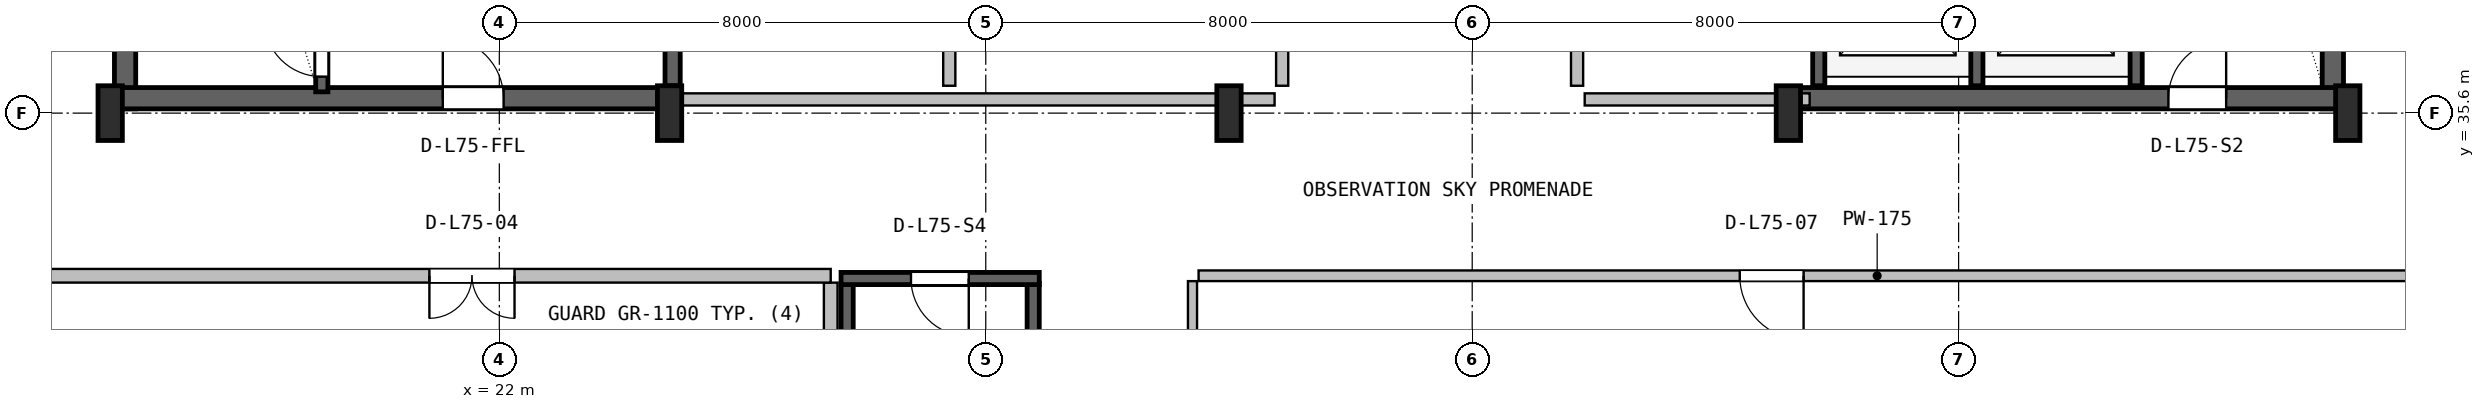
"""IFC4 building model, lengths in metres.
Left out: names, types, materials, properties, quantities, classifications, styles, units other than length and angle.
Written with IfcOpenShell. Run it as: python <this file> out.ifc"""

import sys

from ifc_helpers import new_model, si_unit, direction, frame, frame_2d, origin, origin_2d, place, context, subcontext, project, spatial, rectangle, i_section, extrude, source, transform, mapped, element, fill, save


model = new_model("IFC4")
c1 = context("Model", 3, precision=1e-05, world=origin(), true_north=direction((0.0, 1.0)))
c2 = subcontext(c1, "Body", "Model", "MODEL_VIEW")
j1 = project(units=[si_unit("LENGTHUNIT", "METRE"), si_unit("PLANEANGLEUNIT", "RADIAN")], contexts=[c1])
p1 = place(None, origin())
s1 = spatial("IfcSite", under=j1, at=p1, CompositionType="ELEMENT")
p2 = place(p1, origin())
s2 = spatial("IfcBuilding", under=s1, at=p2, CompositionType="ELEMENT")
p3 = place(p2, frame((0.0, 0.0, 300.2)))
s3 = spatial("IfcBuildingStorey", under=s2, at=p3, CompositionType="ELEMENT", Elevation=300.2)
for number, where, z_axis, x_axis in (
    (1, (15.845, 35.67, 0.0), (0.0, 0.0, 1.0), (0.0, 1.0, 0.0)),
    (2, (52.155, 35.67, 0.0), (0.0, 0.0, 1.0), (0.0, 1.0, 0.0)),
):
    element("IfcWall", number, at=place(p3, frame(where, z_axis=z_axis, x_axis=x_axis)), inside=s3, PredefinedType="SHEAR", context=c2, shape_type="SweptSolid", body=[
        extrude(rectangle(XDim=11.13, YDim=0.35, at=frame_2d((5.565, 0.0))), origin(), (0.0, 0.0, 1.0), 4.52),
    ])
p4 = place(p3, frame((15.67, 35.845, 0.0), z_axis=(0.0, 0.0, 1.0), x_axis=(1.0, 0.0, 0.0)))
e3 = element("IfcWall", 3, at=p4, inside=s3, PredefinedType="SHEAR", context=c2, shape_type="SweptSolid", body=[
    extrude(rectangle(XDim=9.13, YDim=0.35, at=frame_2d((4.565, 0.0))), origin(), (0.0, 0.0, 1.0), 4.52),
])
p5 = place(p4, frame((5.4, 0.0, 0.0)))
e4 = element("IfcOpeningElement", 4, at=p5, cuts=e3, PredefinedType="OPENING", context=c2, shape_type="SweptSolid", body=[
    extrude(rectangle(XDim=1.0, YDim=2.1, at=frame_2d((0.5, 1.05))), frame((0.0, 0.185, 0.0), z_axis=(0.0, -1.0, 0.0), x_axis=(1.0, 0.0, 0.0)), (0.0, 0.0, 1.0), 0.37),
])
p6 = place(p3, frame((43.2, 35.845, 0.0), z_axis=(0.0, 0.0, 1.0), x_axis=(1.0, 0.0, 0.0)))
e5 = element("IfcWall", 5, at=p6, inside=s3, PredefinedType="SHEAR", context=c2, shape_type="SweptSolid", body=[
    extrude(rectangle(XDim=9.13, YDim=0.35, at=frame_2d((4.565, 0.0))), origin(), (0.0, 0.0, 1.0), 4.52),
])
p7 = place(p6, frame((6.25, 0.0, 0.0)))
e6 = element("IfcOpeningElement", 6, at=p7, cuts=e5, PredefinedType="OPENING", context=c2, shape_type="SweptSolid", body=[
    extrude(rectangle(XDim=0.95, YDim=2.1, at=frame_2d((0.475, 1.05))), frame((0.0, 0.185, 0.0), z_axis=(0.0, -1.0, 0.0), x_axis=(1.0, 0.0, 0.0)), (0.0, 0.0, 1.0), 0.37),
])
m1 = source(origin(), c2, "Body", "SweptSolid", [
    extrude(i_section(OverallWidth=0.4, OverallDepth=0.9, WebThickness=0.016, FlangeThickness=0.028, FilletRadius=0.016, at=origin_2d()), origin(), (0.0, 0.0, 1.0), 4.8),
])
for number, where, z_axis, x_axis in (
    (7, (15.6, 35.6, 0.0), (0.0, 0.0, 1.0), (1.0, 0.0, 0.0)),
    (8, (24.8, 35.6, 0.0), (0.0, 0.0, 1.0), (1.0, 0.0, 0.0)),
    (9, (34.0, 35.6, 0.0), (0.0, 0.0, 1.0), (1.0, 0.0, 0.0)),
    (10, (43.2, 35.6, 0.0), (0.0, 0.0, 1.0), (1.0, 0.0, 0.0)),
    (11, (52.4, 35.6, 0.0), (0.0, 0.0, 1.0), (1.0, 0.0, 0.0)),
):
    element("IfcColumn", number, at=place(p3, frame(where, z_axis=z_axis, x_axis=x_axis)), inside=s3, PredefinedType="COLUMN", context=c2, shape_type="MappedRepresentation", body=[
        mapped(m1, transform((0.0, 0.0, 0.0), x_axis=(1.0, 0.0, 0.0), y_axis=(0.0, 1.0, 0.0), z_axis=(0.0, 0.0, 1.0), scale=1.0)),
    ])
p8 = place(p3, frame((19.08, 35.95, 0.0), z_axis=(0.0, 0.0, 1.0), x_axis=(0.0, 1.0, 0.0)))
e12 = element("IfcWall", 12, at=p8, inside=s3, PredefinedType="SHEAR", context=c2, shape_type="SweptSolid", body=[
    extrude(rectangle(XDim=9.65, YDim=0.2, at=frame_2d((4.825, 0.0))), origin(), (0.0, 0.0, 1.0), 4.52),
])
p9 = place(p8, frame((0.25, 0.0, 0.0)))
e13 = element("IfcOpeningElement", 13, at=p9, cuts=e12, PredefinedType="OPENING", context=c2, shape_type="SweptSolid", body=[
    extrude(rectangle(XDim=0.95, YDim=2.1, at=frame_2d((0.475, 1.05))), frame((0.0, 0.11, 0.0), z_axis=(0.0, -1.0, 0.0), x_axis=(1.0, 0.0, 0.0)), (0.0, 0.0, 1.0), 0.22),
])
p10 = place(p3, frame((24.85, 36.05, 0.0), z_axis=(0.0, 0.0, 1.0), x_axis=(0.0, 1.0, 0.0)))
e14 = element("IfcWall", 14, at=p10, inside=s3, PredefinedType="SHEAR", context=c2, shape_type="SweptSolid", body=[
    extrude(rectangle(XDim=10.45, YDim=0.25, at=frame_2d((5.225, 0.0))), origin(), (0.0, 0.0, 1.0), 4.52),
])
p11 = place(p3, frame((48.92, 36.05, 0.0), z_axis=(0.0, 0.0, 1.0), x_axis=(0.0, 1.0, 0.0)))
e15 = element("IfcWall", 15, at=p11, inside=s3, PredefinedType="SHEAR", context=c2, shape_type="SweptSolid", body=[
    extrude(rectangle(XDim=10.5, YDim=0.2, at=frame_2d((5.25, 0.0))), origin(), (0.0, 0.0, 1.0), 4.52),
])
for number, where, z_axis, x_axis in (
    (16, (43.7, 36.05, 0.0), (0.0, 0.0, 1.0), (0.0, 1.0, 0.0)),
    (17, (46.3, 36.05, 0.0), (0.0, 0.0, 1.0), (0.0, 1.0, 0.0)),
):
    element("IfcWall", number, at=place(p3, frame(where, z_axis=z_axis, x_axis=x_axis)), inside=s3, PredefinedType="SHEAR", context=c2, shape_type="SweptSolid", body=[
        extrude(rectangle(XDim=3.05, YDim=0.2, at=frame_2d((1.525, 0.0))), origin(), (0.0, 0.0, 1.0), 4.52),
    ])
for number, where, z_axis, x_axis in (
    (18, (27.72, 26.0, -0.28), (0.0, 0.0, 1.0), (0.0, 1.0, 0.0)),
    (19, (30.78, 26.0, -0.28), (0.0, 0.0, 1.0), (0.0, 1.0, 0.0)),
):
    element("IfcWall", number, at=place(p3, frame(where, z_axis=z_axis, x_axis=x_axis)), inside=s3, PredefinedType="SHEAR", context=c2, shape_type="SweptSolid", body=[
        extrude(rectangle(XDim=6.8, YDim=0.2, at=frame_2d((3.4, 0.0))), origin(), (0.0, 0.0, 1.0), 4.8),
    ])
p12 = place(p3, frame((27.62, 32.88, -0.28), z_axis=(0.0, 0.0, 1.0), x_axis=(1.0, 0.0, 0.0)))
e20 = element("IfcWall", 20, at=p12, inside=s3, PredefinedType="SHEAR", context=c2, shape_type="SweptSolid", body=[
    extrude(rectangle(XDim=3.26, YDim=0.2, at=frame_2d((1.63, 0.0))), origin(), (0.0, 0.0, 1.0), 4.8),
])
p13 = place(p12, frame((1.15, 0.0, 0.28)))
e21 = element("IfcOpeningElement", 21, at=p13, cuts=e20, PredefinedType="OPENING", context=c2, shape_type="SweptSolid", body=[
    extrude(rectangle(XDim=0.95, YDim=2.1, at=frame_2d((0.475, 1.05))), frame((0.0, 0.11, 0.0), z_axis=(0.0, -1.0, 0.0), x_axis=(1.0, 0.0, 0.0)), (0.0, 0.0, 1.0), 0.22),
])
p14 = place(p3, frame((25.0, 35.825, 0.0), z_axis=(0.0, 0.0, 1.0), x_axis=(1.0, 0.0, 0.0)))
e22 = element("IfcWall", 22, at=p14, inside=s3, PredefinedType="PLUMBINGWALL", context=c2, shape_type="SweptSolid", body=[
    extrude(rectangle(XDim=9.75, YDim=0.2, at=frame_2d((4.875, 0.0))), origin(), (0.0, 0.0, 1.0), 3.545),
])
for number, where, z_axis, x_axis in (
    (23, (29.4, 36.05, 0.0), (0.0, 0.0, 1.0), (0.0, 1.0, 0.0)),
    (24, (34.875, 36.05, 0.0), (0.0, 0.0, 1.0), (0.0, 1.0, 0.0)),
):
    element("IfcWall", number, at=place(p3, frame(where, z_axis=z_axis, x_axis=x_axis)), inside=s3, PredefinedType="PLUMBINGWALL", context=c2, shape_type="SweptSolid", body=[
        extrude(rectangle(XDim=3.1, YDim=0.2, at=frame_2d((1.55, 0.0))), origin(), (0.0, 0.0, 1.0), 4.5),
    ])
p15 = place(p3, frame((39.85, 35.825, 0.0), z_axis=(0.0, 0.0, 1.0), x_axis=(1.0, 0.0, 0.0)))
e25 = element("IfcWall", 25, at=p15, inside=s3, PredefinedType="SOLIDWALL", context=c2, shape_type="SweptSolid", body=[
    extrude(rectangle(XDim=3.7, YDim=0.2, at=frame_2d((1.85, 0.0))), origin(), (0.0, 0.0, 1.0), 3.545),
])
p16 = place(p3, frame((39.725, 36.05, 0.0), z_axis=(0.0, 0.0, 1.0), x_axis=(0.0, 1.0, 0.0)))
e26 = element("IfcWall", 26, at=p16, inside=s3, PredefinedType="SOLIDWALL", context=c2, shape_type="SweptSolid", body=[
    extrude(rectangle(XDim=3.1, YDim=0.2, at=frame_2d((1.55, 0.0))), origin(), (0.0, 0.0, 1.0), 4.5),
])
p17 = place(p3, frame((27.45, 13.38, 0.0), z_axis=(0.0, 0.0, 1.0), x_axis=(0.0, 1.0, 0.0)))
e27 = element("IfcWall", 27, at=p17, inside=s3, PredefinedType="PARTITIONING", context=c2, shape_type="SweptSolid", body=[
    extrude(rectangle(XDim=19.432, YDim=0.225, at=frame_2d((9.716, 0.0))), origin(), (0.0, 0.0, 1.0), 3.951),
])
p18 = place(p3, frame((12.18, 32.925, 0.0), z_axis=(0.0, 0.0, 1.0), x_axis=(1.0, 0.0, 0.0)))
e28 = element("IfcWall", 28, at=p18, inside=s3, PredefinedType="PARTITIONING", context=c2, shape_type="SweptSolid", body=[
    extrude(rectangle(XDim=15.27, YDim=0.225, at=frame_2d((7.635, 0.0))), origin(), (0.0, 0.0, 1.0), 3.951),
])
p19 = place(p18, frame((8.67, 0.0, 0.0)))
e29 = element("IfcOpeningElement", 29, at=p19, cuts=e28, PredefinedType="OPENING", context=c2, shape_type="SweptSolid", body=[
    extrude(rectangle(XDim=1.4, YDim=2.12, at=frame_2d((0.7, 1.06))), frame((0.0, 0.123, 0.0), z_axis=(0.0, -1.0, 0.0), x_axis=(1.0, 0.0, 0.0)), (0.0, 0.0, 1.0), 0.245),
])
p20 = place(p3, frame((33.4, 13.38, 0.0), z_axis=(0.0, 0.0, 1.0), x_axis=(0.0, 1.0, 0.0)))
e30 = element("IfcWall", 30, at=p20, inside=s3, PredefinedType="PARTITIONING", context=c2, shape_type="SweptSolid", body=[
    extrude(rectangle(XDim=19.457, YDim=0.15, at=frame_2d((9.729, 0.0))), origin(), (0.0, 0.0, 1.0), 3.951),
])
p21 = place(p20, frame((4.205, 0.0, 0.0)))
e31 = element("IfcOpeningElement", 31, at=p21, cuts=e30, PredefinedType="OPENING", context=c2, shape_type="SweptSolid", body=[
    extrude(rectangle(XDim=0.92, YDim=2.08, at=frame_2d((0.46, 1.04))), frame((0.0, 0.085, 0.0), z_axis=(0.0, -1.0, 0.0), x_axis=(1.0, 0.0, 0.0)), (0.0, 0.0, 1.0), 0.17),
])
p22 = place(p20, frame((10.88, 0.0, 0.0)))
e32 = element("IfcOpeningElement", 32, at=p22, cuts=e30, PredefinedType="OPENING", context=c2, shape_type="SweptSolid", body=[
    extrude(rectangle(XDim=0.88, YDim=2.06, at=frame_2d((0.44, 1.03))), frame((0.0, 0.085, 0.0), z_axis=(0.0, -1.0, 0.0), x_axis=(1.0, 0.0, 0.0)), (0.0, 0.0, 1.0), 0.17),
])
p23 = place(p3, frame((33.5, 32.925, 0.0), z_axis=(0.0, 0.0, 1.0), x_axis=(1.0, 0.0, 0.0)))
e33 = element("IfcWall", 33, at=p23, inside=s3, PredefinedType="PARTITIONING", context=c2, shape_type="SweptSolid", body=[
    extrude(rectangle(XDim=22.32, YDim=0.175, at=frame_2d((11.16, 0.0))), origin(), (0.0, 0.0, 1.0), 3.951),
])
p24 = place(p23, frame((8.9, 0.0, 0.0)))
e34 = element("IfcOpeningElement", 34, at=p24, cuts=e33, PredefinedType="OPENING", context=c2, shape_type="SweptSolid", body=[
    extrude(rectangle(XDim=1.05, YDim=2.1, at=frame_2d((0.525, 1.05))), frame((0.0, 0.098, 0.0), z_axis=(0.0, -1.0, 0.0), x_axis=(1.0, 0.0, 0.0)), (0.0, 0.0, 1.0), 0.195),
])
m2 = source(origin(), c2, "Body", "SweptSolid", [
    extrude(rectangle(XDim=0.95, YDim=2.1, at=frame_2d((0.475, 1.05))), frame((0.0, 0.025, 0.0), z_axis=(0.0, -1.0, 0.0), x_axis=(1.0, 0.0, 0.0)), (0.0, 0.0, 1.0), 0.05),
])
p25 = place(p9, origin())
e35 = element("IfcDoor", 35, at=p25, inside=s3, OperationType="SINGLE_SWING_RIGHT", PredefinedType="DOOR", context=c2, shape_type="MappedRepresentation", body=[
    mapped(m2, transform((0.0, 0.0, 0.0), x_axis=(1.0, 0.0, 0.0), y_axis=(0.0, 1.0, 0.0), z_axis=(0.0, 0.0, 1.0), scale=1.0)),
])
fill(e13, e35)
m3 = source(origin(), c2, "Body", "SweptSolid", [
    extrude(rectangle(XDim=1.0, YDim=2.1, at=frame_2d((0.5, 1.05))), frame((0.0, 0.025, 0.0), z_axis=(0.0, -1.0, 0.0), x_axis=(1.0, 0.0, 0.0)), (0.0, 0.0, 1.0), 0.05),
])
p26 = place(p5, origin())
e36 = element("IfcDoor", 36, at=p26, inside=s3, OperationType="SINGLE_SWING_LEFT", PredefinedType="DOOR", context=c2, shape_type="MappedRepresentation", body=[
    mapped(m3, transform((0.0, 0.0, 0.0), x_axis=(1.0, 0.0, 0.0), y_axis=(0.0, 1.0, 0.0), z_axis=(0.0, 0.0, 1.0), scale=1.0)),
])
fill(e4, e36)
p27 = place(p7, origin())
e37 = element("IfcDoor", 37, at=p27, inside=s3, OperationType="SINGLE_SWING_RIGHT", PredefinedType="DOOR", context=c2, shape_type="MappedRepresentation", body=[
    mapped(m2, transform((0.0, 0.0, 0.0), x_axis=(1.0, 0.0, 0.0), y_axis=(0.0, 1.0, 0.0), z_axis=(0.0, 0.0, 1.0), scale=1.0)),
])
fill(e6, e37)
p28 = place(p13, frame((0.95, 0.0, 0.0), z_axis=(0.0, 0.0, 1.0), x_axis=(-1.0, 0.0, 0.0)))
e38 = element("IfcDoor", 38, at=p28, inside=s3, OperationType="SINGLE_SWING_RIGHT", PredefinedType="DOOR", context=c2, shape_type="MappedRepresentation", body=[
    mapped(m2, transform((0.0, 0.0, 0.0), x_axis=(1.0, 0.0, 0.0), y_axis=(0.0, 1.0, 0.0), z_axis=(0.0, 0.0, 1.0), scale=1.0)),
])
fill(e21, e38)
m4 = source(origin(), c2, "Body", "SweptSolid", [
    extrude(rectangle(XDim=1.4, YDim=2.12, at=frame_2d((0.7, 1.06))), frame((0.0, 0.025, 0.0), z_axis=(0.0, -1.0, 0.0), x_axis=(1.0, 0.0, 0.0)), (0.0, 0.0, 1.0), 0.05),
])
p29 = place(p19, frame((1.4, 0.0, 0.0), z_axis=(0.0, 0.0, 1.0), x_axis=(-1.0, 0.0, 0.0)))
e39 = element("IfcDoor", 39, at=p29, inside=s3, OperationType="DOUBLE_DOOR_SINGLE_SWING", PredefinedType="DOOR", context=c2, shape_type="MappedRepresentation", body=[
    mapped(m4, transform((0.0, 0.0, 0.0), x_axis=(1.0, 0.0, 0.0), y_axis=(0.0, 1.0, 0.0), z_axis=(0.0, 0.0, 1.0), scale=1.0)),
])
fill(e29, e39)
m5 = source(origin(), c2, "Body", "SweptSolid", [
    extrude(rectangle(XDim=1.05, YDim=2.1, at=frame_2d((0.525, 1.05))), frame((0.0, 0.025, 0.0), z_axis=(0.0, -1.0, 0.0), x_axis=(1.0, 0.0, 0.0)), (0.0, 0.0, 1.0), 0.05),
])
p30 = place(p24, frame((1.05, 0.0, 0.0), z_axis=(0.0, 0.0, 1.0), x_axis=(-1.0, 0.0, 0.0)))
e40 = element("IfcDoor", 40, at=p30, inside=s3, OperationType="SINGLE_SWING_RIGHT", PredefinedType="DOOR", context=c2, shape_type="MappedRepresentation", body=[
    mapped(m5, transform((0.0, 0.0, 0.0), x_axis=(1.0, 0.0, 0.0), y_axis=(0.0, 1.0, 0.0), z_axis=(0.0, 0.0, 1.0), scale=1.0)),
])
fill(e34, e40)
save(model, sys.argv[1])
